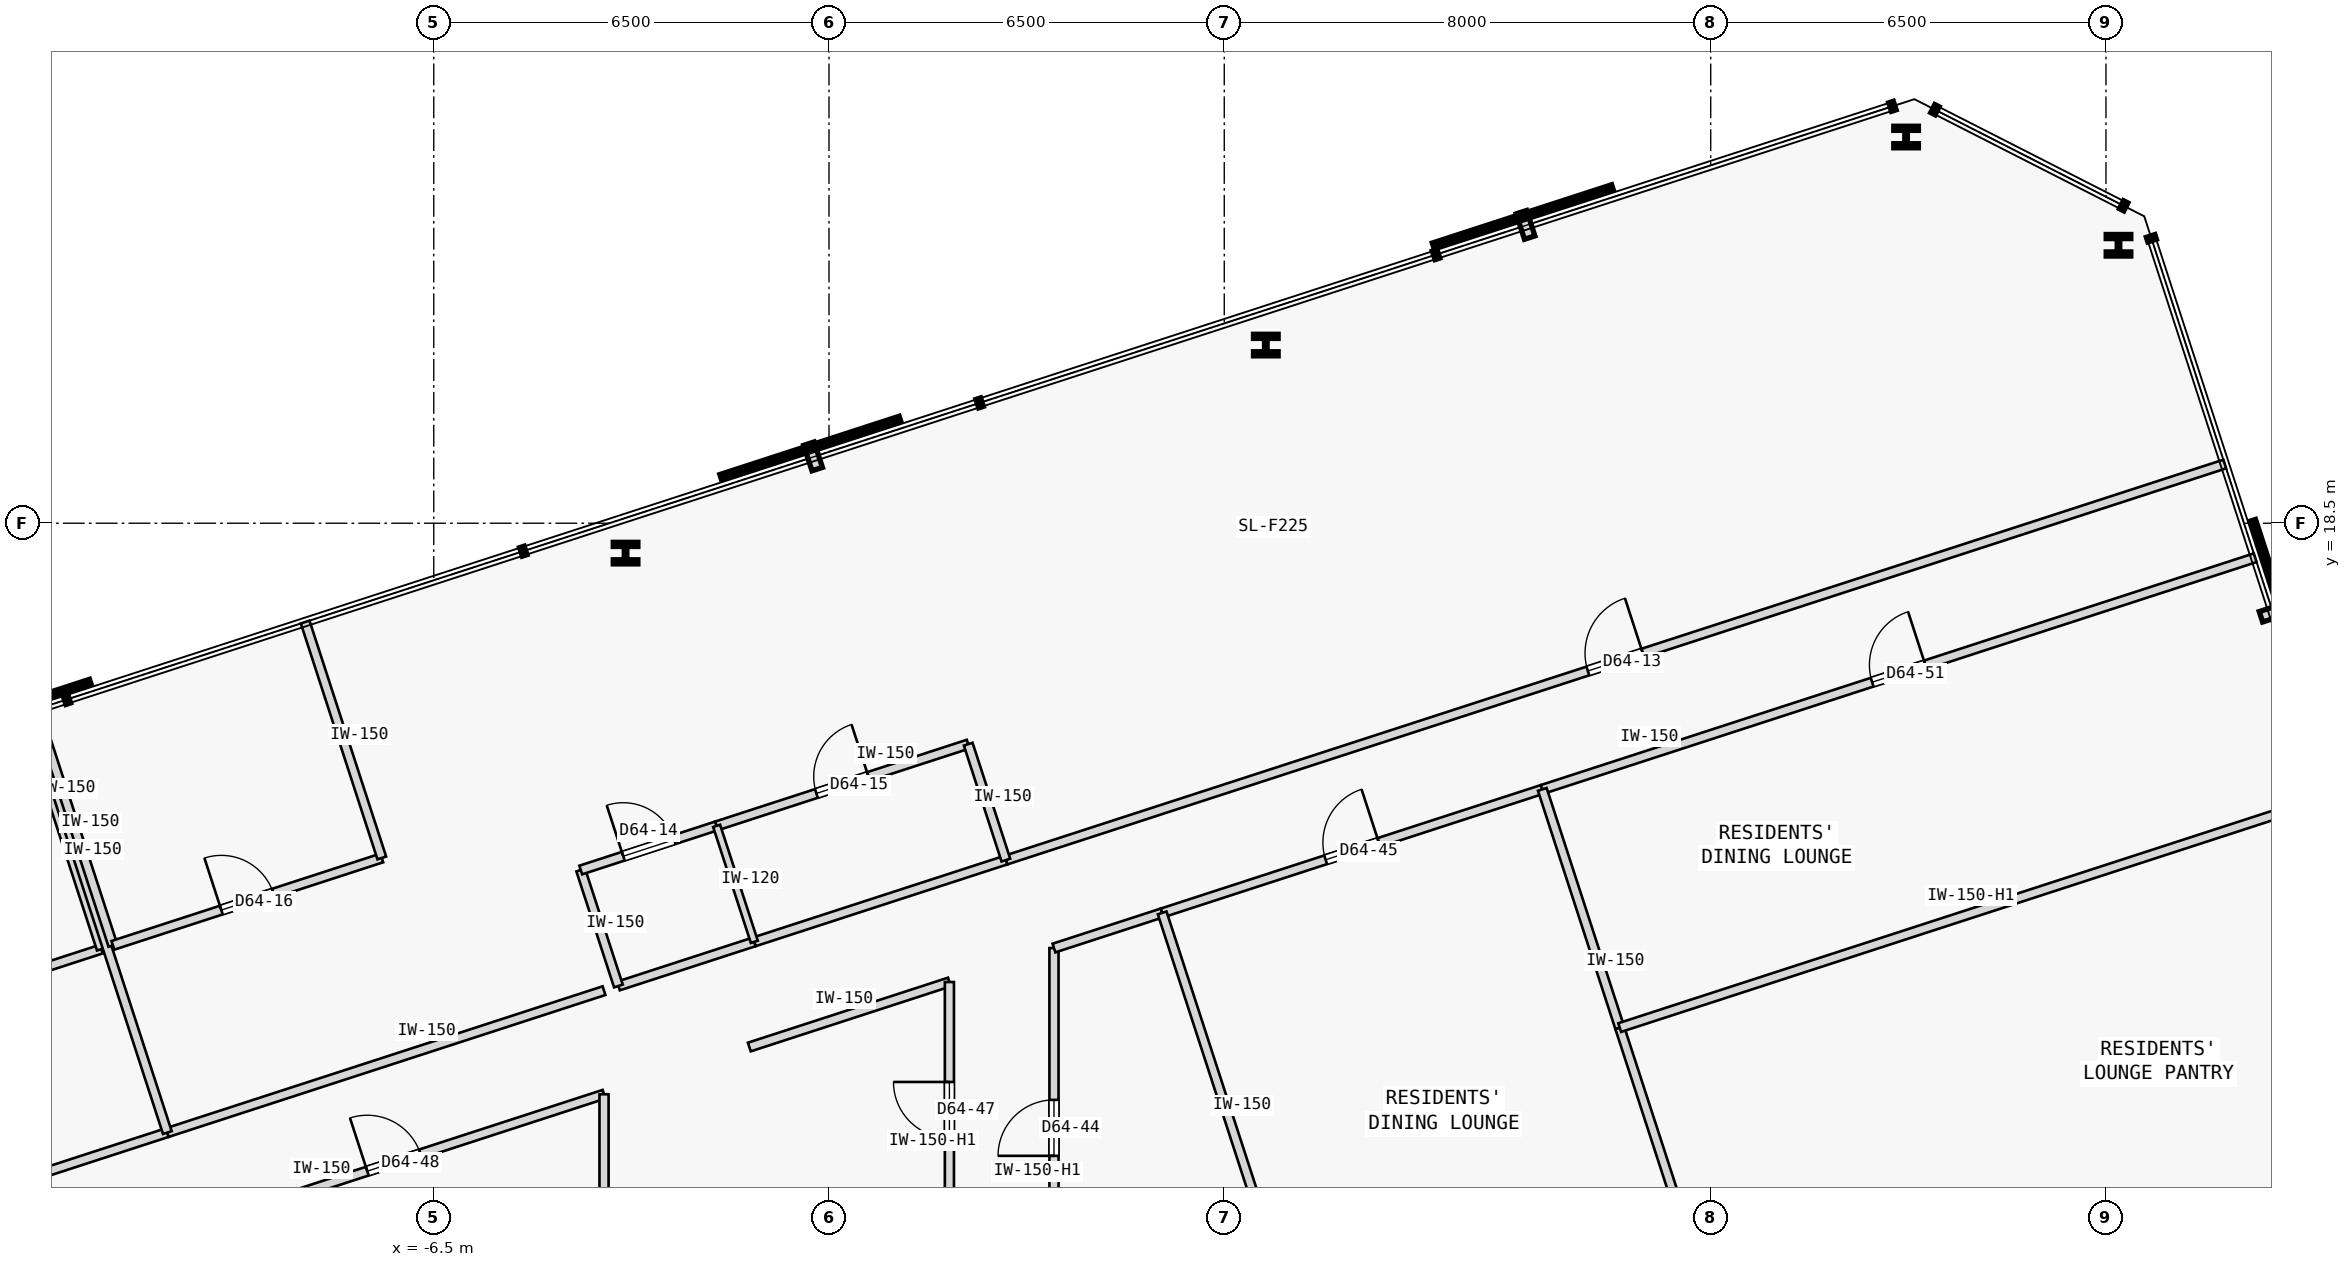
"""IFC4 building model, lengths in metres.
Left out: names, types, materials, properties, quantities, classifications, styles, units other than length and angle.
Written with IfcOpenShell. Run it as: python <this file> out.ifc"""

import sys

from ifc_helpers import new_model, si_unit, direction, frame, frame_2d, origin, origin_2d, place, context, subcontext, project, spatial, rectangle, i_section, extrude, element, fill, save


model = new_model("IFC4")
c1 = context("Model", 3, precision=1e-05, world=origin(), true_north=direction((0.0, 1.0)))
c2 = subcontext(c1, "Body", "Model", "MODEL_VIEW")
j1 = project(units=[si_unit("LENGTHUNIT", "METRE"), si_unit("PLANEANGLEUNIT", "RADIAN")], contexts=[c1])
p1 = place(None, origin())
s1 = spatial("IfcSite", under=j1, at=p1, CompositionType="ELEMENT")
p2 = place(p1, origin())
s2 = spatial("IfcBuilding", under=s1, at=p2, CompositionType="ELEMENT")
p3 = place(p2, frame((0.0, 0.0, 241.05)))
s3 = spatial("IfcBuildingStorey", under=s2, at=p3, CompositionType="ELEMENT", Elevation=241.05)
for number, where, z_axis, x_axis in (
    (1, (21.206, 23.071, 0.0), (0.0, 0.0, 1.0), (1.0, 0.0, 0.0)),
    (2, (17.713, 24.851, 0.0), (0.0, 0.0, 1.0), (1.0, 0.0, 0.0)),
    (3, (7.184, 21.43, 0.0), (0.0, 0.0, 1.0), (1.0, 0.0, 0.0)),
    (4, (-3.346, 18.009, 0.0), (0.0, 0.0, 1.0), (1.0, 0.0, 0.0)),
):
    element("IfcColumn", number, at=place(p3, frame(where, z_axis=z_axis, x_axis=x_axis)), inside=s3, PredefinedType="COLUMN", context=c2, shape_type="SweptSolid", body=[
        extrude(i_section(OverallWidth=0.405, OverallDepth=0.355, WebThickness=0.042, FlangeThickness=0.068, FilletRadius=0.015, at=origin_2d()), origin(), (0.0, 0.0, 1.0), 3.35),
    ])
p4 = place(p3, frame((-24.022, 4.21, 0.0), z_axis=(0.0, 0.0, 1.0), x_axis=(0.951058997127, 0.309009359055, 0.0)))
e5 = element("IfcWall", 5, at=p4, inside=s3, PredefinedType="PARTITIONING", context=c2, shape_type="SweptSolid", body=[
    extrude(rectangle(XDim=13.817, YDim=0.15, at=frame_2d((6.908, 0.0))), origin(), (0.0, 0.0, 1.0), 3.125),
])
p5 = place(p4, frame((6.434, 0.0, 0.0)))
e6 = element("IfcOpeningElement", 6, at=p5, cuts=e5, PredefinedType="OPENING", context=c2, shape_type="SweptSolid", body=[
    extrude(rectangle(XDim=0.95, YDim=2.15, at=frame_2d((0.475, 1.075))), frame((0.0, 0.085, 0.0), z_axis=(0.0, -1.0, 0.0), x_axis=(1.0, 0.0, 0.0)), (0.0, 0.0, 1.0), 0.17),
])
p6 = place(p3, frame((-10.882, 8.479, 0.0), z_axis=(0.0, 0.0, 1.0), x_axis=(0.951051887333, 0.309031240494, 0.0)))
e7 = element("IfcWall", 7, at=p6, inside=s3, PredefinedType="PARTITIONING", context=c2, shape_type="SweptSolid", body=[
    extrude(rectangle(XDim=7.551, YDim=0.15, at=frame_2d((3.775, 0.0))), origin(), (0.0, 0.0, 1.0), 3.125),
])
p7 = place(p3, frame((2.909, 12.96, 0.0), z_axis=(0.0, 0.0, 1.0), x_axis=(0.951056113966, 0.309018232614, 0.0)))
e8 = element("IfcWall", 8, at=p7, inside=s3, PredefinedType="PARTITIONING", context=c2, shape_type="SweptSolid", body=[
    extrude(rectangle(XDim=21.076, YDim=0.15, at=frame_2d((10.538, 0.0))), origin(), (0.0, 0.0, 1.0), 3.125),
])
p8 = place(p7, frame((10.063, 0.0, 0.0)))
e9 = element("IfcOpeningElement", 9, at=p8, cuts=e8, PredefinedType="OPENING", context=c2, shape_type="SweptSolid", body=[
    extrude(rectangle(XDim=0.95, YDim=2.15, at=frame_2d((0.475, 1.075))), frame((0.0, 0.085, 0.0), z_axis=(0.0, -1.0, 0.0), x_axis=(1.0, 0.0, 0.0)), (0.0, 0.0, 1.0), 0.17),
])
p9 = place(p3, frame((-3.463, 10.89, 0.0), z_axis=(0.0, 0.0, 1.0), x_axis=(0.951045519245, 0.309050837767, 0.0)))
e10 = element("IfcWall", 10, at=p9, inside=s3, PredefinedType="PARTITIONING", context=c2, shape_type="SweptSolid", body=[
    extrude(rectangle(XDim=2.35, YDim=0.15, at=frame_2d((1.175, 0.0))), origin(), (0.0, 0.0, 1.0), 3.125),
])
p10 = place(p3, frame((-1.228, 11.616, 0.0), z_axis=(0.0, 0.0, 1.0), x_axis=(0.951069122051, 0.308978195154, 0.0)))
e11 = element("IfcWall", 11, at=p10, inside=s3, PredefinedType="PARTITIONING", context=c2, shape_type="SweptSolid", body=[
    extrude(rectangle(XDim=4.35, YDim=0.15, at=frame_2d((2.175, 0.0))), origin(), (0.0, 0.0, 1.0), 3.125),
])
p11 = place(p3, frame((3.7, 5.6, 0.0), z_axis=(0.0, 0.0, 1.0), x_axis=(-0.000123839008, 0.999999992332, 0.0)))
e12 = element("IfcWall", 12, at=p11, inside=s3, PredefinedType="PARTITIONING", context=c2, shape_type="SweptSolid", body=[
    extrude(rectangle(XDim=5.914, YDim=0.15, at=frame_2d((2.957, 0.0))), origin(), (0.0, 0.0, 1.0), 2.675),
])
p12 = place(p11, frame((2.497, 0.0, 0.0)))
e13 = element("IfcOpeningElement", 13, at=p12, cuts=e12, PredefinedType="OPENING", context=c2, shape_type="SweptSolid", body=[
    extrude(rectangle(XDim=0.92, YDim=2.15, at=frame_2d((0.46, 1.075))), frame((0.0, 0.085, 0.0), z_axis=(0.0, -1.0, 0.0), x_axis=(1.0, 0.0, 0.0)), (0.0, 0.0, 1.0), 0.17),
])
p13 = place(p3, frame((3.699, 11.514, 0.0), z_axis=(0.0, 0.0, 1.0), x_axis=(0.951069540665, 0.308976906612, 0.0)))
e14 = element("IfcWall", 14, at=p13, inside=s3, PredefinedType="PARTITIONING", context=c2, shape_type="SweptSolid", body=[
    extrude(rectangle(XDim=1.871, YDim=0.15, at=frame_2d((0.936, 0.0))), origin(), (0.0, 0.0, 1.0), 3.125),
])
p14 = place(p3, frame((5.479, 12.092, 0.0), z_axis=(0.0, 0.0, 1.0), x_axis=(0.951051809397, 0.309031480343, 0.0)))
e15 = element("IfcWall", 15, at=p14, inside=s3, PredefinedType="PARTITIONING", context=c2, shape_type="SweptSolid", body=[
    extrude(rectangle(XDim=6.573, YDim=0.15, at=frame_2d((3.287, 0.0))), origin(), (0.0, 0.0, 1.0), 3.125),
])
p15 = place(p14, frame((2.826, 0.0, 0.0)))
e16 = element("IfcOpeningElement", 16, at=p15, cuts=e15, PredefinedType="OPENING", context=c2, shape_type="SweptSolid", body=[
    extrude(rectangle(XDim=0.92, YDim=2.15, at=frame_2d((0.46, 1.075))), frame((0.0, 0.085, 0.0), z_axis=(0.0, -1.0, 0.0), x_axis=(1.0, 0.0, 0.0)), (0.0, 0.0, 1.0), 0.17),
])
p16 = place(p3, frame((-1.311, 9.886, 0.0), z_axis=(0.0, 0.0, 1.0), x_axis=(0.951068803905, 0.308979174442, 0.0)))
e17 = element("IfcWall", 17, at=p16, inside=s3, PredefinedType="PARTITIONING", context=c2, shape_type="SweptSolid", body=[
    extrude(rectangle(XDim=3.46, YDim=0.15, at=frame_2d((1.73, 0.0))), origin(), (0.0, 0.0, 1.0), 3.125),
])
p17 = place(p3, frame((1.98, 6.748, 0.0), z_axis=(0.0, 0.0, 1.0), x_axis=(0.0, 1.0, 0.0)))
e18 = element("IfcWall", 18, at=p17, inside=s3, PredefinedType="PARTITIONING", context=c2, shape_type="SweptSolid", body=[
    extrude(rectangle(XDim=4.207, YDim=0.15, at=frame_2d((2.104, 0.0))), origin(), (0.0, 0.0, 1.0), 2.675),
])
p18 = place(p17, frame((1.643, 0.0, 0.0)))
e19 = element("IfcOpeningElement", 19, at=p18, cuts=e18, PredefinedType="OPENING", context=c2, shape_type="SweptSolid", body=[
    extrude(rectangle(XDim=0.92, YDim=2.15, at=frame_2d((0.46, 1.075))), frame((0.0, 0.085, 0.0), z_axis=(0.0, -1.0, 0.0), x_axis=(1.0, 0.0, 0.0)), (0.0, 0.0, 1.0), 0.17),
])
p19 = place(p3, frame((-10.612, 6.864, 0.0), z_axis=(0.0, 0.0, 1.0), x_axis=(0.951060972078, 0.309003280548, 0.0)))
e20 = element("IfcWall", 20, at=p19, inside=s3, PredefinedType="PARTITIONING", context=c2, shape_type="SweptSolid", body=[
    extrude(rectangle(XDim=7.268, YDim=0.15, at=frame_2d((3.634, 0.0))), origin(), (0.0, 0.0, 1.0), 3.125),
])
p20 = place(p19, frame((3.174, 0.0, 0.0)))
e21 = element("IfcOpeningElement", 21, at=p20, cuts=e20, PredefinedType="OPENING", context=c2, shape_type="SweptSolid", body=[
    extrude(rectangle(XDim=0.92, YDim=2.15, at=frame_2d((0.46, 1.075))), frame((0.0, 0.085, 0.0), z_axis=(0.0, -1.0, 0.0), x_axis=(1.0, 0.0, 0.0)), (0.0, 0.0, 1.0), 0.17),
])
p21 = place(p3, frame((-3.7, 5.6, 0.0), z_axis=(0.0, 0.0, 1.0), x_axis=(0.000139120755, 0.999999990323, 0.0)))
e22 = element("IfcWall", 22, at=p21, inside=s3, PredefinedType="PARTITIONING", context=c2, shape_type="SweptSolid", body=[
    extrude(rectangle(XDim=3.51, YDim=0.15, at=frame_2d((1.755, 0.0))), origin(), (0.0, 0.0, 1.0), 3.125),
])
p22 = place(p3, frame((11.73, 14.123, 0.0), z_axis=(0.0, 0.0, 1.0), x_axis=(0.951060263663, 0.309005460926, 0.0)))
e23 = element("IfcWall", 23, at=p22, inside=s3, PredefinedType="PARTITIONING", context=c2, shape_type="SweptSolid", body=[
    extrude(rectangle(XDim=12.327, YDim=0.15, at=frame_2d((6.164, 0.0))), origin(), (0.0, 0.0, 1.0), 3.125),
])
p23 = place(p22, frame((5.704, 0.0, 0.0)))
e24 = element("IfcOpeningElement", 24, at=p23, cuts=e23, PredefinedType="OPENING", context=c2, shape_type="SweptSolid", body=[
    extrude(rectangle(XDim=0.92, YDim=2.15, at=frame_2d((0.46, 1.075))), frame((0.0, 0.085, 0.0), z_axis=(0.0, -1.0, 0.0), x_axis=(1.0, 0.0, 0.0)), (0.0, 0.0, 1.0), 0.17),
])
p24 = place(p3, frame((-16.389, 10.06, 0.0), z_axis=(0.0, 0.0, 1.0), x_axis=(0.951050272606, 0.309036209813, 0.0)))
e25 = element("IfcWall", 25, at=p24, inside=s3, PredefinedType="PARTITIONING", context=c2, shape_type="SweptSolid", body=[
    extrude(rectangle(XDim=4.65, YDim=0.15, at=frame_2d((2.325, 0.0))), origin(), (0.0, 0.0, 1.0), 3.125),
])
p25 = place(p24, frame((1.875, 0.0, 0.0)))
e26 = element("IfcOpeningElement", 26, at=p25, cuts=e25, PredefinedType="OPENING", context=c2, shape_type="SweptSolid", body=[
    extrude(rectangle(XDim=0.9, YDim=2.15, at=frame_2d((0.45, 1.075))), frame((0.0, 0.085, 0.0), z_axis=(0.0, -1.0, 0.0), x_axis=(1.0, 0.0, 0.0)), (0.0, 0.0, 1.0), 0.17),
])
p26 = place(p3, frame((-11.967, 11.497, 0.0), z_axis=(0.0, 0.0, 1.0), x_axis=(-0.309018403393, 0.951056058476, 0.0)))
e27 = element("IfcWall", 27, at=p26, inside=s3, PredefinedType="PARTITIONING", context=c2, shape_type="SweptSolid", body=[
    extrude(rectangle(XDim=4.079, YDim=0.15, at=frame_2d((2.04, 0.0))), origin(), (0.0, 0.0, 1.0), 3.125),
])
p27 = place(p3, frame((-10.882, 8.479, 0.0), z_axis=(0.0, 0.0, 1.0), x_axis=(-0.308998913866, 0.951062390819, 0.0)))
e28 = element("IfcWall", 28, at=p27, inside=s3, PredefinedType="PARTITIONING", context=c2, shape_type="SweptSolid", body=[
    extrude(rectangle(XDim=7.284, YDim=0.15, at=frame_2d((3.642, 0.0))), origin(), (0.0, 0.0, 1.0), 3.125),
])
p28 = place(p3, frame((-3.463, 10.89, 0.0), z_axis=(0.0, 0.0, 1.0), x_axis=(-0.308912611775, 0.951090425925, 0.0)))
e29 = element("IfcWall", 29, at=p28, inside=s3, PredefinedType="PARTITIONING", context=c2, shape_type="SweptSolid", body=[
    extrude(rectangle(XDim=2.005, YDim=0.15, at=frame_2d((1.002, 0.0))), origin(), (0.0, 0.0, 1.0), 3.125),
])
p29 = place(p3, frame((-4.083, 12.797, 0.0), z_axis=(0.0, 0.0, 1.0), x_axis=(0.951066131077, 0.308987401554, 0.0)))
e30 = element("IfcWall", 30, at=p29, inside=s3, PredefinedType="PARTITIONING", context=c2, shape_type="SweptSolid", body=[
    extrude(rectangle(XDim=2.35, YDim=0.15, at=frame_2d((1.175, 0.0))), origin(), (0.0, 0.0, 1.0), 3.125),
])
p30 = place(p29, frame((0.735, 0.0, 0.0)))
e31 = element("IfcOpeningElement", 31, at=p30, cuts=e30, PredefinedType="OPENING", context=c2, shape_type="SweptSolid", body=[
    extrude(rectangle(XDim=0.88, YDim=2.15, at=frame_2d((0.44, 1.075))), frame((0.0, 0.085, 0.0), z_axis=(0.0, -1.0, 0.0), x_axis=(1.0, 0.0, 0.0)), (0.0, 0.0, 1.0), 0.17),
])
p31 = place(p3, frame((-1.848, 13.523, 0.0), z_axis=(0.0, 0.0, 1.0), x_axis=(0.951057987102, 0.309012467661, 0.0)))
e32 = element("IfcWall", 32, at=p31, inside=s3, PredefinedType="PARTITIONING", context=c2, shape_type="SweptSolid", body=[
    extrude(rectangle(XDim=4.35, YDim=0.15, at=frame_2d((2.175, 0.0))), origin(), (0.0, 0.0, 1.0), 3.125),
])
p32 = place(p31, frame((1.725, 0.0, 0.0)))
e33 = element("IfcOpeningElement", 33, at=p32, cuts=e32, PredefinedType="OPENING", context=c2, shape_type="SweptSolid", body=[
    extrude(rectangle(XDim=0.9, YDim=2.15, at=frame_2d((0.45, 1.075))), frame((0.0, 0.085, 0.0), z_axis=(0.0, -1.0, 0.0), x_axis=(1.0, 0.0, 0.0)), (0.0, 0.0, 1.0), 0.17),
])
p33 = place(p3, frame((2.909, 12.96, 0.0), z_axis=(0.0, 0.0, 1.0), x_axis=(-0.308912611775, 0.951090425925, 0.0)))
e34 = element("IfcWall", 34, at=p33, inside=s3, PredefinedType="PARTITIONING", context=c2, shape_type="SweptSolid", body=[
    extrude(rectangle(XDim=2.005, YDim=0.15, at=frame_2d((1.002, 0.0))), origin(), (0.0, 0.0, 1.0), 3.125),
])
p34 = place(p3, frame((-11.777, 11.559, 0.0), z_axis=(0.0, 0.0, 1.0), x_axis=(-0.309018403393, 0.951056058476, 0.0)))
e35 = element("IfcWall", 35, at=p34, inside=s3, PredefinedType="PARTITIONING", context=c2, shape_type="SweptSolid", body=[
    extrude(rectangle(XDim=4.079, YDim=0.15, at=frame_2d((2.04, 0.0))), origin(), (0.0, 0.0, 1.0), 3.125),
])
p35 = place(p3, frame((-11.777, 11.559, 0.0), z_axis=(0.0, 0.0, 1.0), x_axis=(0.951050272606, 0.309036209813, 0.0)))
e36 = element("IfcWall", 36, at=p35, inside=s3, PredefinedType="PARTITIONING", context=c2, shape_type="SweptSolid", body=[
    extrude(rectangle(XDim=4.65, YDim=0.15, at=frame_2d((2.325, 0.0))), origin(), (0.0, 0.0, 1.0), 3.125),
])
p36 = place(p35, frame((1.875, 0.0, 0.0)))
e37 = element("IfcOpeningElement", 37, at=p36, cuts=e36, PredefinedType="OPENING", context=c2, shape_type="SweptSolid", body=[
    extrude(rectangle(XDim=0.9, YDim=2.15, at=frame_2d((0.45, 1.075))), frame((0.0, 0.085, 0.0), z_axis=(0.0, -1.0, 0.0), x_axis=(1.0, 0.0, 0.0)), (0.0, 0.0, 1.0), 0.17),
])
p37 = place(p3, frame((-7.354, 12.996, 0.0), z_axis=(0.0, 0.0, 1.0), x_axis=(-0.309018403393, 0.951056058476, 0.0)))
e38 = element("IfcWall", 38, at=p37, inside=s3, PredefinedType="PARTITIONING", context=c2, shape_type="SweptSolid", body=[
    extrude(rectangle(XDim=4.079, YDim=0.15, at=frame_2d((2.04, 0.0))), origin(), (0.0, 0.0, 1.0), 3.125),
])
p38 = place(p3, frame((-1.228, 11.616, 0.0), z_axis=(0.0, 0.0, 1.0), x_axis=(-0.309058537449, 0.951043017129, 0.0)))
e39 = element("IfcWall", 39, at=p38, inside=s3, PredefinedType="PARTITIONING", context=c2, shape_type="SweptSolid", body=[
    extrude(rectangle(XDim=2.005, YDim=0.12, at=frame_2d((1.002, 0.0))), origin(), (0.0, 0.0, 1.0), 3.125),
])
p39 = place(p3, frame((7.588, 5.6, 0.0), z_axis=(0.0, 0.0, 1.0), x_axis=(-0.309018946982, 0.951055881852, 0.0)))
e40 = element("IfcWall", 40, at=p39, inside=s3, PredefinedType="PARTITIONING", context=c2, shape_type="SweptSolid", body=[
    extrude(rectangle(XDim=6.826, YDim=0.15, at=frame_2d((3.413, 0.0))), origin(), (0.0, 0.0, 1.0), 3.125),
])
p40 = place(p3, frame((14.5, 5.6, 0.0), z_axis=(0.0, 0.0, 1.0), x_axis=(-0.308974360462, 0.951070367837, 0.0)))
e41 = element("IfcWall", 41, at=p40, inside=s3, PredefinedType="PARTITIONING", context=c2, shape_type="SweptSolid", body=[
    extrude(rectangle(XDim=4.843, YDim=0.15, at=frame_2d((2.421, 0.0))), origin(), (0.0, 0.0, 1.0), 3.125),
])
p41 = place(p3, frame((13.003, 10.206, 0.0), z_axis=(0.0, 0.0, 1.0), x_axis=(-0.309035144366, 0.951050618814, 0.0)))
e42 = element("IfcWall", 42, at=p41, inside=s3, PredefinedType="PARTITIONING", context=c2, shape_type="SweptSolid", body=[
    extrude(rectangle(XDim=4.119, YDim=0.15, at=frame_2d((2.06, 0.0))), origin(), (0.0, 0.0, 1.0), 3.125),
])
p42 = place(p3, frame((13.003, 10.206, 0.0), z_axis=(0.0, 0.0, 1.0), x_axis=(0.951060263663, 0.309005460926, 0.0)))
e43 = element("IfcWall", 43, at=p42, inside=s3, PredefinedType="PARTITIONING", context=c2, shape_type="SweptSolid", body=[
    extrude(rectangle(XDim=12.327, YDim=0.15, at=frame_2d((6.164, 0.0))), origin(), (0.0, 0.0, 1.0), 2.675),
])
p43 = place(p8, origin())
e44 = element("IfcDoor", 44, at=p43, inside=s3, OperationType="SINGLE_SWING_RIGHT", PredefinedType="DOOR", context=c2, shape_type="SweptSolid", body=[
    extrude(rectangle(XDim=0.95, YDim=2.15, at=frame_2d((0.475, 1.075))), frame((0.0, 0.025, 0.0), z_axis=(0.0, -1.0, 0.0), x_axis=(1.0, 0.0, 0.0)), (0.0, 0.0, 1.0), 0.05),
])
fill(e9, e44)
p44 = place(p30, origin())
e45 = element("IfcDoor", 45, at=p44, inside=s3, OperationType="SINGLE_SWING_LEFT", PredefinedType="DOOR", context=c2, shape_type="SweptSolid", body=[
    extrude(rectangle(XDim=0.88, YDim=2.15, at=frame_2d((0.44, 1.075))), frame((0.0, 0.025, 0.0), z_axis=(0.0, -1.0, 0.0), x_axis=(1.0, 0.0, 0.0)), (0.0, 0.0, 1.0), 0.05),
])
fill(e31, e45)
p45 = place(p32, origin())
e46 = element("IfcDoor", 46, at=p45, inside=s3, OperationType="SINGLE_SWING_RIGHT", PredefinedType="DOOR", context=c2, shape_type="SweptSolid", body=[
    extrude(rectangle(XDim=0.9, YDim=2.15, at=frame_2d((0.45, 1.075))), frame((0.0, 0.025, 0.0), z_axis=(0.0, -1.0, 0.0), x_axis=(1.0, 0.0, 0.0)), (0.0, 0.0, 1.0), 0.05),
])
fill(e33, e46)
p46 = place(p36, origin())
e47 = element("IfcDoor", 47, at=p46, inside=s3, OperationType="SINGLE_SWING_LEFT", PredefinedType="DOOR", context=c2, shape_type="SweptSolid", body=[
    extrude(rectangle(XDim=0.9, YDim=2.15, at=frame_2d((0.45, 1.075))), frame((0.0, 0.025, 0.0), z_axis=(0.0, -1.0, 0.0), x_axis=(1.0, 0.0, 0.0)), (0.0, 0.0, 1.0), 0.05),
])
fill(e37, e47)
p47 = place(p12, origin())
e48 = element("IfcDoor", 48, at=p47, inside=s3, OperationType="SINGLE_SWING_LEFT", PredefinedType="DOOR", context=c2, shape_type="SweptSolid", body=[
    extrude(rectangle(XDim=0.92, YDim=2.15, at=frame_2d((0.46, 1.075))), frame((0.0, 0.025, 0.0), z_axis=(0.0, -1.0, 0.0), x_axis=(1.0, 0.0, 0.0)), (0.0, 0.0, 1.0), 0.05),
])
fill(e13, e48)
p48 = place(p15, origin())
e49 = element("IfcDoor", 49, at=p48, inside=s3, OperationType="SINGLE_SWING_RIGHT", PredefinedType="DOOR", context=c2, shape_type="SweptSolid", body=[
    extrude(rectangle(XDim=0.92, YDim=2.15, at=frame_2d((0.46, 1.075))), frame((0.0, 0.025, 0.0), z_axis=(0.0, -1.0, 0.0), x_axis=(1.0, 0.0, 0.0)), (0.0, 0.0, 1.0), 0.05),
])
fill(e16, e49)
p49 = place(p18, origin())
e50 = element("IfcDoor", 50, at=p49, inside=s3, OperationType="SINGLE_SWING_RIGHT", PredefinedType="DOOR", context=c2, shape_type="SweptSolid", body=[
    extrude(rectangle(XDim=0.92, YDim=2.15, at=frame_2d((0.46, 1.075))), frame((0.0, 0.025, 0.0), z_axis=(0.0, -1.0, 0.0), x_axis=(1.0, 0.0, 0.0)), (0.0, 0.0, 1.0), 0.05),
])
fill(e19, e50)
p50 = place(p20, origin())
e51 = element("IfcDoor", 51, at=p50, inside=s3, OperationType="SINGLE_SWING_LEFT", PredefinedType="DOOR", context=c2, shape_type="SweptSolid", body=[
    extrude(rectangle(XDim=0.92, YDim=2.15, at=frame_2d((0.46, 1.075))), frame((0.0, 0.025, 0.0), z_axis=(0.0, -1.0, 0.0), x_axis=(1.0, 0.0, 0.0)), (0.0, 0.0, 1.0), 0.05),
])
fill(e21, e51)
p51 = place(p23, origin())
e52 = element("IfcDoor", 52, at=p51, inside=s3, OperationType="SINGLE_SWING_RIGHT", PredefinedType="DOOR", context=c2, shape_type="SweptSolid", body=[
    extrude(rectangle(XDim=0.92, YDim=2.15, at=frame_2d((0.46, 1.075))), frame((0.0, 0.025, 0.0), z_axis=(0.0, -1.0, 0.0), x_axis=(1.0, 0.0, 0.0)), (0.0, 0.0, 1.0), 0.05),
])
fill(e24, e52)
save(model, sys.argv[1])
